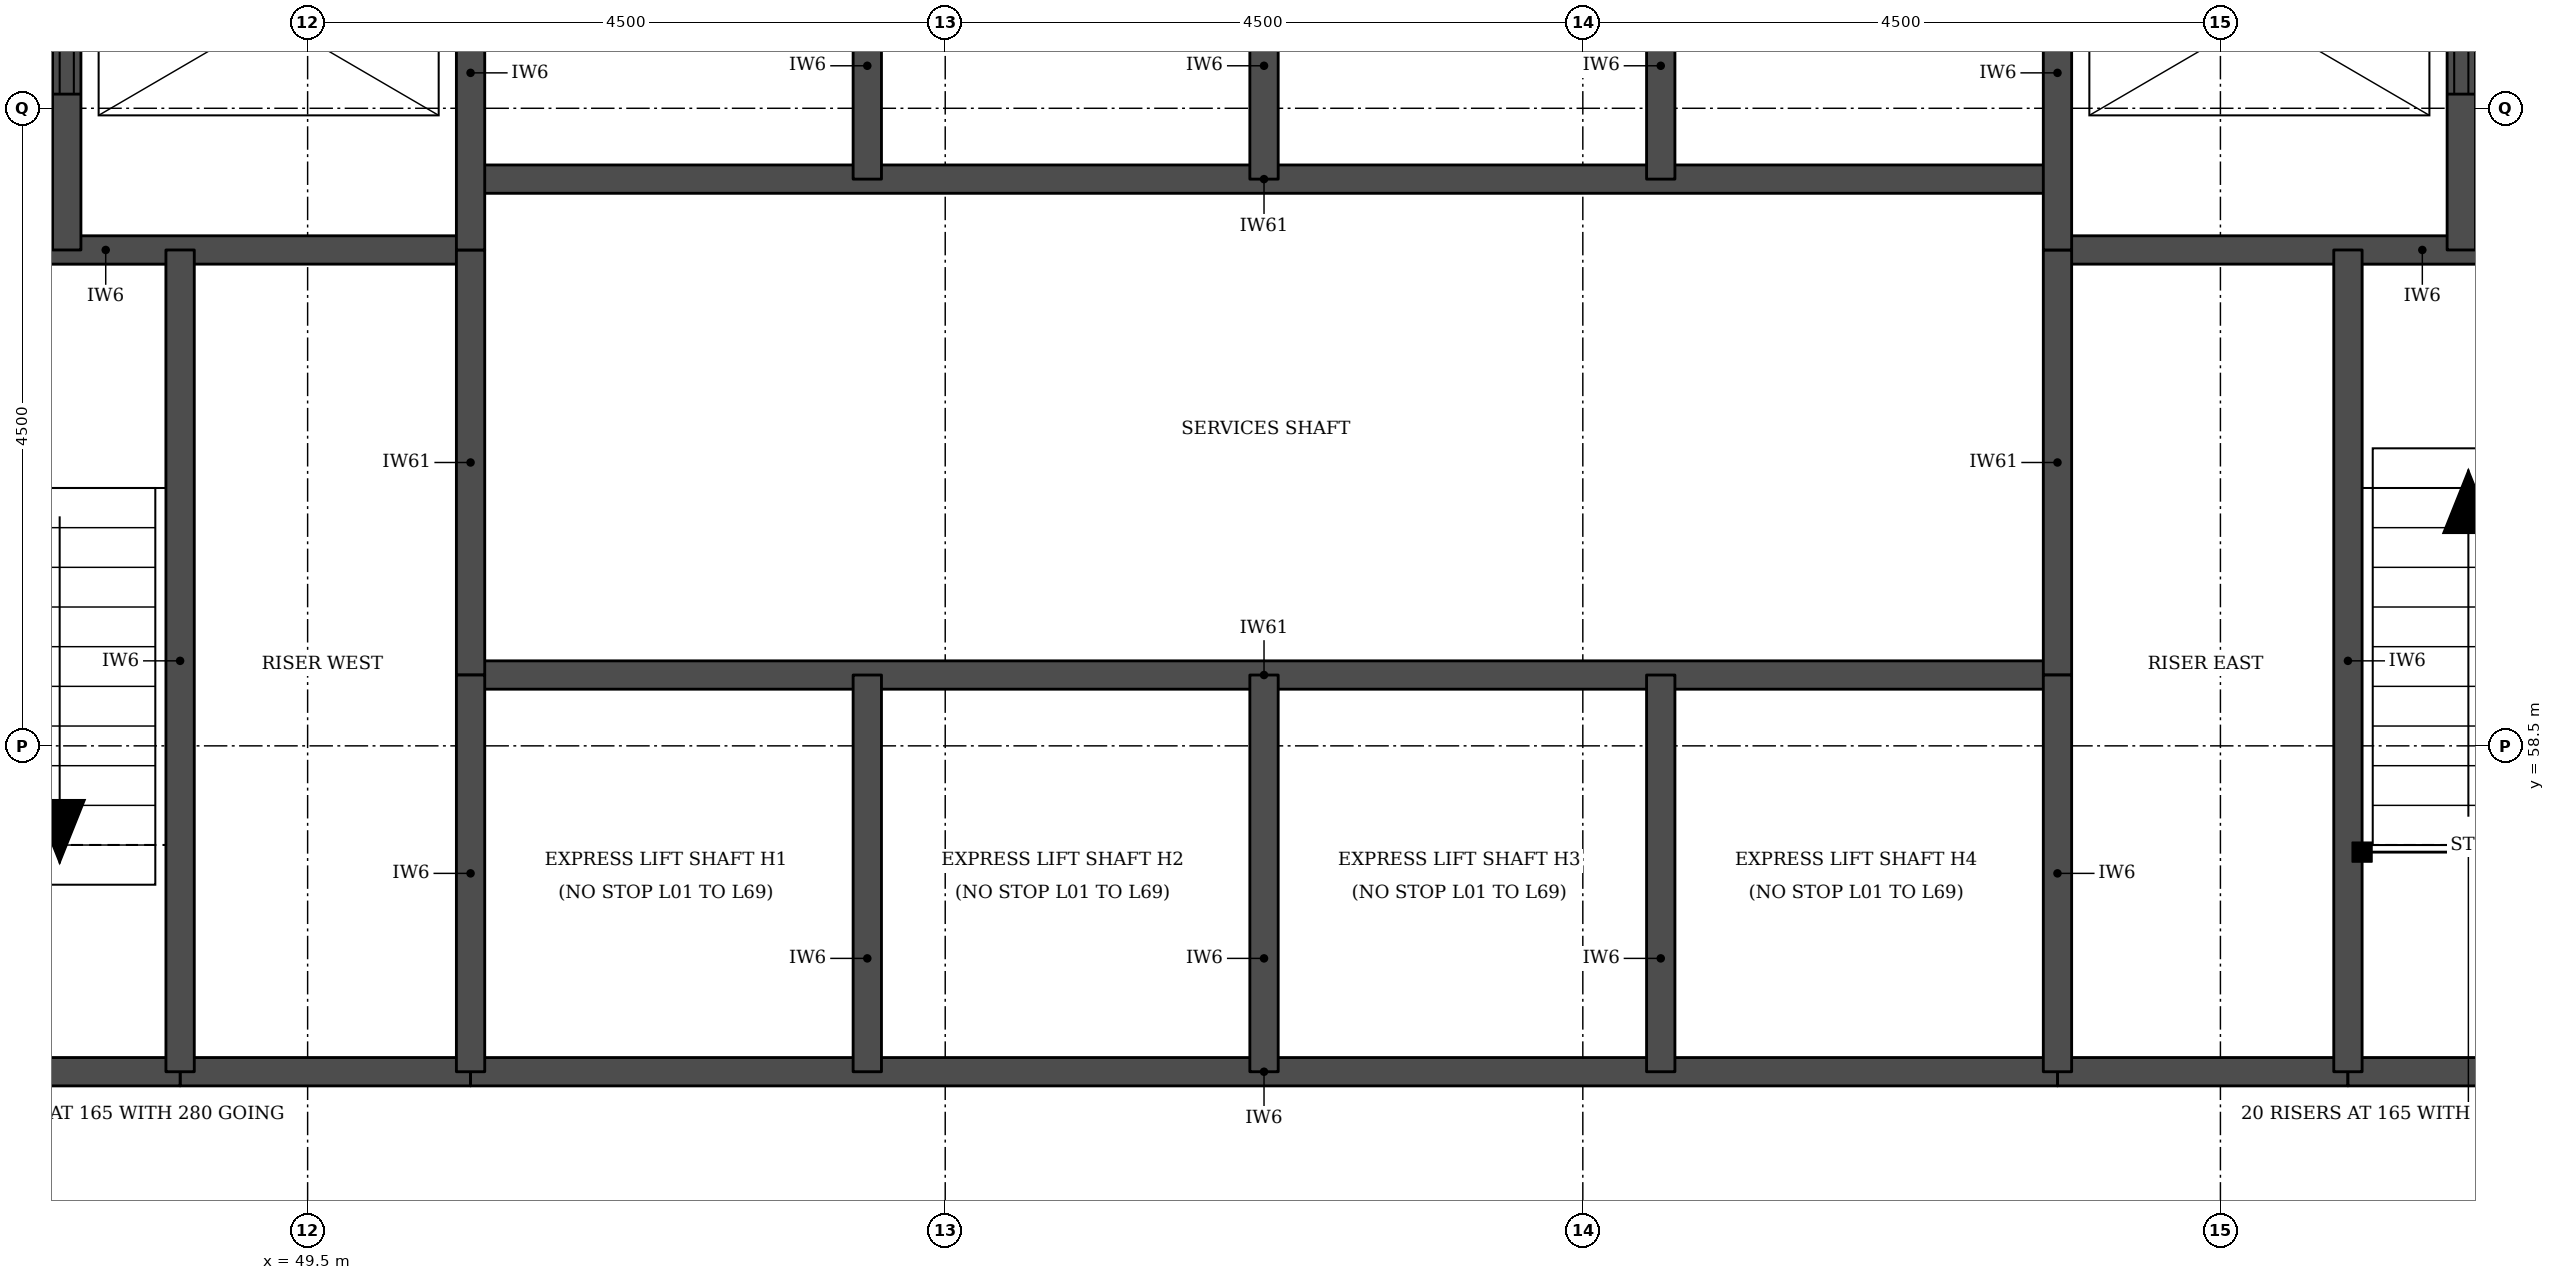
"""IFC4 building model, lengths in metres.
Left out: names, types, materials, properties, quantities, classifications, styles, units other than length and angle.
Written with IfcOpenShell. Run it as: python <this file> out.ifc"""

import sys

from ifc_helpers import new_model, si_unit, direction, frame, frame_2d, origin, place, context, subcontext, project, spatial, rectangle, extrude, element, fill, save


model = new_model("IFC4")
c1 = context("Model", 3, precision=1e-05, world=origin(), true_north=direction((0.0, 1.0)))
c2 = subcontext(c1, "Body", "Model", "MODEL_VIEW")
j1 = project(units=[si_unit("LENGTHUNIT", "METRE"), si_unit("PLANEANGLEUNIT", "RADIAN")], contexts=[c1])
p1 = place(None, origin())
s1 = spatial("IfcSite", under=j1, at=p1, CompositionType="ELEMENT")
p2 = place(p1, origin())
s2 = spatial("IfcBuilding", under=s1, at=p2, CompositionType="ELEMENT")
p3 = place(p2, frame((0.0, 0.0, 23.1)))
s3 = spatial("IfcBuildingStorey", under=s2, at=p3, CompositionType="ELEMENT", Elevation=23.1)
for number, where, z_axis, x_axis in (
    (1, (48.6, 56.2, 0.0), (0.0, 0.0, 1.0), (1.0, 0.0, 0.0)),
    (2, (61.85, 56.2, 0.0), (0.0, 0.0, 1.0), (1.0, 0.0, 0.0)),
):
    element("IfcWall", number, at=place(p3, frame(where, z_axis=z_axis, x_axis=x_axis)), inside=s3, PredefinedType="SOLIDWALL", context=c2, shape_type="SweptSolid", body=[
        extrude(rectangle(XDim=2.05, YDim=0.2, at=frame_2d((1.025, 0.0))), origin(), (0.0, 0.0, 1.0), 3.08),
    ])
p4 = place(p3, frame((45.5, 56.2, 0.0), z_axis=(0.0, 0.0, 1.0), x_axis=(1.0, 0.0, 0.0)))
e3 = element("IfcWall", 3, at=p4, inside=s3, PredefinedType="SOLIDWALL", context=c2, shape_type="SweptSolid", body=[
    extrude(rectangle(XDim=3.1, YDim=0.2, at=frame_2d((1.55, 0.0))), origin(), (0.0, 0.0, 1.0), 3.08),
])
p5 = place(p3, frame((50.65, 56.2, 0.0), z_axis=(0.0, 0.0, 1.0), x_axis=(1.0, 0.0, 0.0)))
e4 = element("IfcWall", 4, at=p5, inside=s3, PredefinedType="SOLIDWALL", context=c2, shape_type="SweptSolid", body=[
    extrude(rectangle(XDim=11.2, YDim=0.2, at=frame_2d((5.6, 0.0))), origin(), (0.0, 0.0, 1.0), 3.08),
])
p6 = place(p3, frame((63.9, 56.2, 0.0), z_axis=(0.0, 0.0, 1.0), x_axis=(1.0, 0.0, 0.0)))
e5 = element("IfcWall", 5, at=p6, inside=s3, PredefinedType="SOLIDWALL", context=c2, shape_type="SweptSolid", body=[
    extrude(rectangle(XDim=3.1, YDim=0.2, at=frame_2d((1.55, 0.0))), origin(), (0.0, 0.0, 1.0), 3.08),
])
p7 = place(p3, frame((50.65, 59.0, 0.0), z_axis=(0.0, 0.0, 1.0), x_axis=(1.0, 0.0, 0.0)))
e6 = element("IfcWall", 6, at=p7, inside=s3, PredefinedType="SOLIDWALL", context=c2, shape_type="SweptSolid", body=[
    extrude(rectangle(XDim=11.2, YDim=0.2, at=frame_2d((5.6, 0.0))), origin(), (0.0, 0.0, 1.0), 3.3),
])
for number, where, z_axis, x_axis in (
    (7, (45.5, 62.0, 0.0), (0.0, 0.0, 1.0), (1.0, 0.0, 0.0)),
    (8, (61.85, 62.0, 0.0), (0.0, 0.0, 1.0), (1.0, 0.0, 0.0)),
):
    element("IfcWall", number, at=place(p3, frame(where, z_axis=z_axis, x_axis=x_axis)), inside=s3, PredefinedType="SOLIDWALL", context=c2, shape_type="SweptSolid", body=[
        extrude(rectangle(XDim=5.15, YDim=0.2, at=frame_2d((2.575, 0.0))), origin(), (0.0, 0.0, 1.0), 3.08),
    ])
p8 = place(p3, frame((50.65, 62.5, 0.0), z_axis=(0.0, 0.0, 1.0), x_axis=(1.0, 0.0, 0.0)))
e9 = element("IfcWall", 9, at=p8, inside=s3, PredefinedType="SOLIDWALL", context=c2, shape_type="SweptSolid", body=[
    extrude(rectangle(XDim=11.2, YDim=0.2, at=frame_2d((5.6, 0.0))), origin(), (0.0, 0.0, 1.0), 3.3),
])
p9 = place(p3, frame((47.8, 62.0, 0.0), z_axis=(0.0, 0.0, 1.0), x_axis=(0.0, 1.0, 0.0)))
e10 = element("IfcWall", 10, at=p9, inside=s3, PredefinedType="SOLIDWALL", context=c2, shape_type="SweptSolid", body=[
    extrude(rectangle(XDim=3.3, YDim=0.2, at=frame_2d((1.65, 0.0))), origin(), (0.0, 0.0, 1.0), 3.08),
])
p10 = place(p9, frame((1.1, 0.0, 0.0)))
e11 = element("IfcOpeningElement", 11, at=p10, cuts=e10, PredefinedType="OPENING", context=c2, shape_type="SweptSolid", body=[
    extrude(rectangle(XDim=1.1, YDim=2.1, at=frame_2d((0.55, 1.05))), frame((0.0, 0.11, 0.0), z_axis=(0.0, -1.0, 0.0), x_axis=(1.0, 0.0, 0.0)), (0.0, 0.0, 1.0), 0.22),
])
p11 = place(p3, frame((48.6, 56.2, 0.0), z_axis=(0.0, 0.0, 1.0), x_axis=(0.0, 1.0, 0.0)))
e12 = element("IfcWall", 12, at=p11, inside=s3, PredefinedType="SOLIDWALL", context=c2, shape_type="SweptSolid", body=[
    extrude(rectangle(XDim=5.8, YDim=0.2, at=frame_2d((2.9, 0.0))), origin(), (0.0, 0.0, 1.0), 3.08),
])
p12 = place(p3, frame((50.65, 59.0, 0.0), z_axis=(0.0, 0.0, 1.0), x_axis=(0.0, 1.0, 0.0)))
e13 = element("IfcWall", 13, at=p12, inside=s3, PredefinedType="SOLIDWALL", context=c2, shape_type="SweptSolid", body=[
    extrude(rectangle(XDim=3.0, YDim=0.2, at=frame_2d((1.5, 0.0))), origin(), (0.0, 0.0, 1.0), 3.3),
])
p13 = place(p3, frame((50.65, 56.2, 0.0), z_axis=(0.0, 0.0, 1.0), x_axis=(0.0, 1.0, 0.0)))
e14 = element("IfcWall", 14, at=p13, inside=s3, PredefinedType="SOLIDWALL", context=c2, shape_type="SweptSolid", body=[
    extrude(rectangle(XDim=2.8, YDim=0.2, at=frame_2d((1.4, 0.0))), origin(), (0.0, 0.0, 1.0), 3.08),
])
p14 = place(p3, frame((50.65, 62.0, 0.0), z_axis=(0.0, 0.0, 1.0), x_axis=(0.0, 1.0, 0.0)))
e15 = element("IfcWall", 15, at=p14, inside=s3, PredefinedType="SOLIDWALL", context=c2, shape_type="SweptSolid", body=[
    extrude(rectangle(XDim=3.3, YDim=0.2, at=frame_2d((1.65, 0.0))), origin(), (0.0, 0.0, 1.0), 3.08),
])
for number, where, z_axis, x_axis in (
    (16, (53.45, 56.2, 0.0), (0.0, 0.0, 1.0), (0.0, 1.0, 0.0)),
    (17, (53.45, 62.5, 0.0), (0.0, 0.0, 1.0), (0.0, 1.0, 0.0)),
    (18, (56.25, 56.2, 0.0), (0.0, 0.0, 1.0), (0.0, 1.0, 0.0)),
    (19, (56.25, 62.5, 0.0), (0.0, 0.0, 1.0), (0.0, 1.0, 0.0)),
    (20, (59.05, 56.2, 0.0), (0.0, 0.0, 1.0), (0.0, 1.0, 0.0)),
    (21, (59.05, 62.5, 0.0), (0.0, 0.0, 1.0), (0.0, 1.0, 0.0)),
):
    element("IfcWall", number, at=place(p3, frame(where, z_axis=z_axis, x_axis=x_axis)), inside=s3, PredefinedType="SOLIDWALL", context=c2, shape_type="SweptSolid", body=[
        extrude(rectangle(XDim=2.8, YDim=0.2, at=frame_2d((1.4, 0.0))), origin(), (0.0, 0.0, 1.0), 3.08),
    ])
p15 = place(p3, frame((61.85, 59.0, 0.0), z_axis=(0.0, 0.0, 1.0), x_axis=(0.0, 1.0, 0.0)))
e22 = element("IfcWall", 22, at=p15, inside=s3, PredefinedType="SOLIDWALL", context=c2, shape_type="SweptSolid", body=[
    extrude(rectangle(XDim=3.0, YDim=0.2, at=frame_2d((1.5, 0.0))), origin(), (0.0, 0.0, 1.0), 3.3),
])
p16 = place(p3, frame((61.85, 56.2, 0.0), z_axis=(0.0, 0.0, 1.0), x_axis=(0.0, 1.0, 0.0)))
e23 = element("IfcWall", 23, at=p16, inside=s3, PredefinedType="SOLIDWALL", context=c2, shape_type="SweptSolid", body=[
    extrude(rectangle(XDim=2.8, YDim=0.2, at=frame_2d((1.4, 0.0))), origin(), (0.0, 0.0, 1.0), 3.08),
])
p17 = place(p3, frame((61.85, 62.0, 0.0), z_axis=(0.0, 0.0, 1.0), x_axis=(0.0, 1.0, 0.0)))
e24 = element("IfcWall", 24, at=p17, inside=s3, PredefinedType="SOLIDWALL", context=c2, shape_type="SweptSolid", body=[
    extrude(rectangle(XDim=3.3, YDim=0.2, at=frame_2d((1.65, 0.0))), origin(), (0.0, 0.0, 1.0), 3.08),
])
p18 = place(p3, frame((63.9, 56.2, 0.0), z_axis=(0.0, 0.0, 1.0), x_axis=(0.0, 1.0, 0.0)))
e25 = element("IfcWall", 25, at=p18, inside=s3, PredefinedType="SOLIDWALL", context=c2, shape_type="SweptSolid", body=[
    extrude(rectangle(XDim=5.8, YDim=0.2, at=frame_2d((2.9, 0.0))), origin(), (0.0, 0.0, 1.0), 3.08),
])
p19 = place(p3, frame((64.7, 62.0, 0.0), z_axis=(0.0, 0.0, 1.0), x_axis=(0.0, 1.0, 0.0)))
e26 = element("IfcWall", 26, at=p19, inside=s3, PredefinedType="SOLIDWALL", context=c2, shape_type="SweptSolid", body=[
    extrude(rectangle(XDim=3.3, YDim=0.2, at=frame_2d((1.65, 0.0))), origin(), (0.0, 0.0, 1.0), 3.08),
])
p20 = place(p19, frame((1.1, 0.0, 0.0)))
e27 = element("IfcOpeningElement", 27, at=p20, cuts=e26, PredefinedType="OPENING", context=c2, shape_type="SweptSolid", body=[
    extrude(rectangle(XDim=1.1, YDim=2.1, at=frame_2d((0.55, 1.05))), frame((0.0, 0.11, 0.0), z_axis=(0.0, -1.0, 0.0), x_axis=(1.0, 0.0, 0.0)), (0.0, 0.0, 1.0), 0.22),
])
p21 = place(p10, origin())
e28 = element("IfcDoor", 28, at=p21, inside=s3, OperationType="DOUBLE_DOOR_SLIDING", PredefinedType="DOOR", context=c2, shape_type="SweptSolid", body=[
    extrude(rectangle(XDim=1.1, YDim=2.1, at=frame_2d((0.55, 1.05))), frame((0.0, 0.025, 0.0), z_axis=(0.0, -1.0, 0.0), x_axis=(1.0, 0.0, 0.0)), (0.0, 0.0, 1.0), 0.05),
])
fill(e11, e28)
p22 = place(p20, origin())
e29 = element("IfcDoor", 29, at=p22, inside=s3, OperationType="DOUBLE_DOOR_SLIDING", PredefinedType="DOOR", context=c2, shape_type="SweptSolid", body=[
    extrude(rectangle(XDim=1.1, YDim=2.1, at=frame_2d((0.55, 1.05))), frame((0.0, 0.025, 0.0), z_axis=(0.0, -1.0, 0.0), x_axis=(1.0, 0.0, 0.0)), (0.0, 0.0, 1.0), 0.05),
])
fill(e27, e29)
save(model, sys.argv[1])
